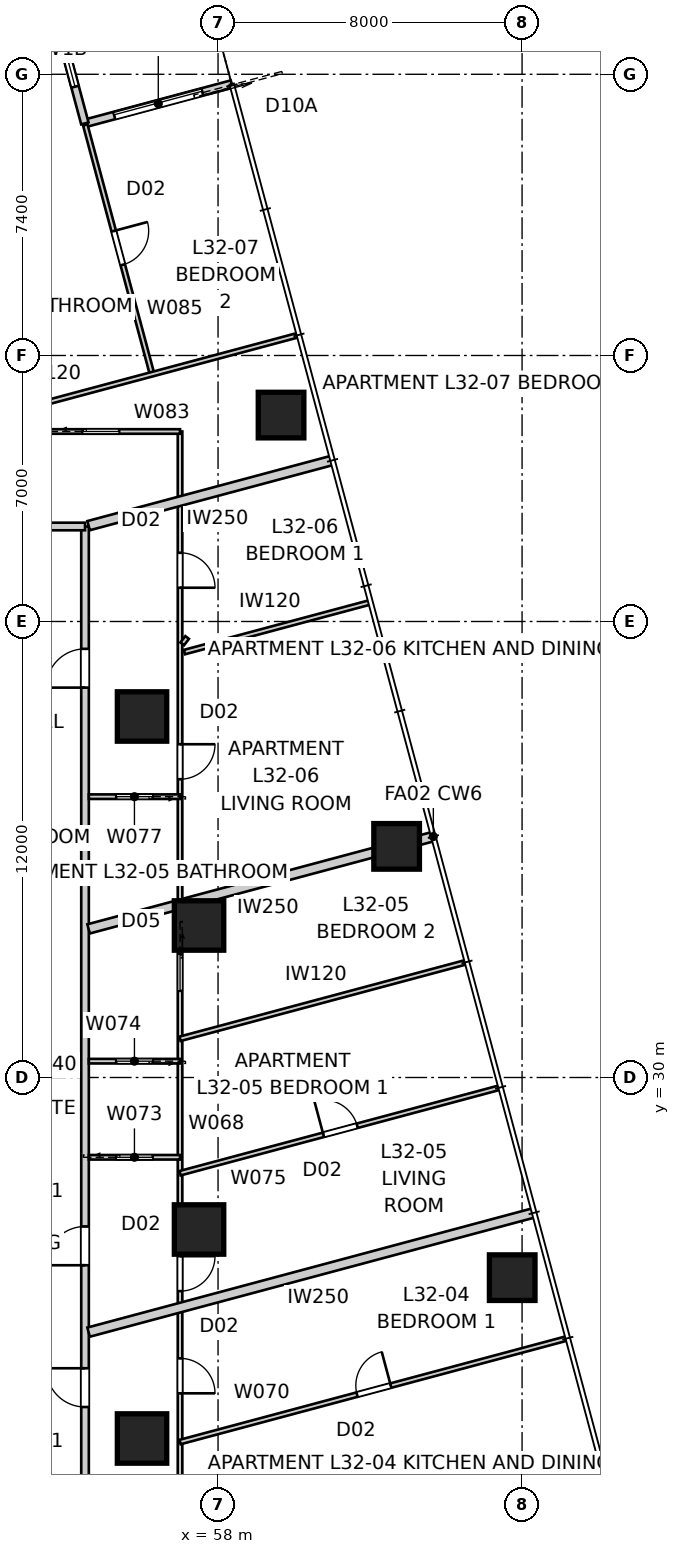
"""IFC4 building model, lengths in metres.
Left out: names, types, materials, properties, quantities, classifications, styles, units other than length and angle.
Written with IfcOpenShell. Run it as: python <this file> out.ifc"""

import sys

from ifc_helpers import new_model, si_unit, direction, frame, frame_2d, origin, origin_2d, place, context, subcontext, project, spatial, rectangle, extrude, element, fill, save


model = new_model("IFC4")
c1 = context("Model", 3, precision=1e-05, world=origin(), true_north=direction((0.0, 1.0)))
c2 = subcontext(c1, "Body", "Model", "MODEL_VIEW")
j1 = project(units=[si_unit("LENGTHUNIT", "METRE"), si_unit("PLANEANGLEUNIT", "RADIAN")], contexts=[c1])
p1 = place(None, origin())
s1 = spatial("IfcSite", under=j1, at=p1, CompositionType="ELEMENT")
p2 = place(p1, origin())
s2 = spatial("IfcBuilding", under=s1, at=p2, CompositionType="ELEMENT")
p3 = place(p2, frame((0.0, 0.0, 118.4)))
s3 = spatial("IfcBuildingStorey", under=s2, at=p3, CompositionType="ELEMENT", Elevation=118.4)
for number, where, z_axis, x_axis in (
    (1, (65.74, 24.733, 0.0), (0.0, 0.0, 1.0), (1.0, 0.0, 0.0)),
    (2, (62.699, 36.082, 0.0), (0.0, 0.0, 1.0), (1.0, 0.0, 0.0)),
    (3, (59.658, 47.432, 0.0), (0.0, 0.0, 1.0), (1.0, 0.0, 0.0)),
):
    element("IfcColumn", number, at=place(p3, frame(where, z_axis=z_axis, x_axis=x_axis)), inside=s3, PredefinedType="COLUMN", context=c2, shape_type="SweptSolid", body=[
        extrude(rectangle(XDim=1.2, YDim=1.2, at=origin_2d()), origin(), (0.0, 0.0, 1.0), 3.4),
    ])
for number, where, z_axis, x_axis in (
    (4, (57.5, 26.0, 0.0), (0.0, 0.0, 1.0), (1.0, 0.0, 0.0)),
    (5, (57.5, 34.0, 0.0), (0.0, 0.0, 1.0), (1.0, 0.0, 0.0)),
    (6, (56.0, 39.5, 0.0), (0.0, 0.0, 1.0), (1.0, 0.0, 0.0)),
    (7, (56.0, 20.5, 0.0), (0.0, 0.0, 1.0), (1.0, 0.0, 0.0)),
):
    element("IfcColumn", number, at=place(p3, frame(where, z_axis=z_axis, x_axis=x_axis)), inside=s3, PredefinedType="COLUMN", context=c2, shape_type="SweptSolid", body=[
        extrude(rectangle(XDim=1.3, YDim=1.3, at=origin_2d()), origin(), (0.0, 0.0, 1.0), 3.4),
    ])
p4 = place(p3, frame((58.359, 56.143, 0.0), z_axis=(0.0, 0.0, 1.0), x_axis=(-0.965919172068, -0.258843877716, 0.0)))
e8 = element("IfcWall", 8, at=p4, inside=s3, PredefinedType="SOLIDWALL", context=c2, shape_type="SweptSolid", body=[
    extrude(rectangle(XDim=4.0, YDim=0.2, at=frame_2d((2.0, 0.0))), origin(), (0.0, 0.0, 1.0), 3.25),
])
p5 = place(p4, frame((0.8, 0.0, 0.0)))
e9 = element("IfcOpeningElement", 9, at=p5, cuts=e8, PredefinedType="OPENING", context=c2, shape_type="SweptSolid", body=[
    extrude(rectangle(XDim=2.4, YDim=2.1, at=frame_2d((1.2, 1.05))), frame((0.0, 0.11, 0.0), z_axis=(0.0, -1.0, 0.0), x_axis=(1.0, 0.0, 0.0)), (0.0, 0.0, 1.0), 0.22),
])
p6 = place(p3, frame((54.496, 55.107, 0.0), z_axis=(0.0, 0.0, 1.0), x_axis=(-0.258786931944, 0.965934430412, 0.0)))
e10 = element("IfcWall", 10, at=p6, inside=s3, PredefinedType="SOLIDWALL", context=c2, shape_type="SweptSolid", body=[
    extrude(rectangle(XDim=4.0, YDim=0.2, at=frame_2d((2.0, 0.0))), origin(), (0.0, 0.0, 1.0), 3.25),
])
p7 = place(p6, frame((1.0, 0.0, 0.45)))
e11 = element("IfcOpeningElement", 11, at=p7, cuts=e10, PredefinedType="OPENING", context=c2, shape_type="SweptSolid", body=[
    extrude(rectangle(XDim=2.0, YDim=1.8, at=frame_2d((1.0, 0.9))), frame((0.0, 0.11, 0.0), z_axis=(0.0, -1.0, 0.0), x_axis=(1.0, 0.0, 0.0)), (0.0, 0.0, 1.0), 0.22),
])
p8 = place(p3, frame((54.5, 15.5, 0.0), z_axis=(0.0, 0.0, 1.0), x_axis=(0.0, 1.0, 0.0)))
e12 = element("IfcWall", 12, at=p8, inside=s3, PredefinedType="PARTITIONING", context=c2, shape_type="SweptSolid", body=[
    extrude(rectangle(XDim=29.0, YDim=0.2, at=frame_2d((14.5, 0.0))), origin(), (0.0, 0.0, 1.0), 3.25),
])
p9 = place(p8, frame((24.76, 0.0, 0.0)))
e13 = element("IfcOpeningElement", 13, at=p9, cuts=e12, PredefinedType="OPENING", context=c2, shape_type="SweptSolid", body=[
    extrude(rectangle(XDim=1.02, YDim=2.1, at=frame_2d((0.51, 1.05))), frame((0.0, 0.11, 0.0), z_axis=(0.0, -1.0, 0.0), x_axis=(1.0, 0.0, 0.0)), (0.0, 0.0, 1.0), 0.22),
])
p10 = place(p8, frame((5.829, 0.0, 0.0)))
e14 = element("IfcOpeningElement", 14, at=p10, cuts=e12, PredefinedType="OPENING", context=c2, shape_type="SweptSolid", body=[
    extrude(rectangle(XDim=1.02, YDim=2.34, at=frame_2d((0.51, 1.17))), frame((0.0, 0.11, 0.0), z_axis=(0.0, -1.0, 0.0), x_axis=(1.0, 0.0, 0.0)), (0.0, 0.0, 1.0), 0.22),
])
p11 = place(p8, frame((9.559, 0.0, 0.0)))
e15 = element("IfcOpeningElement", 15, at=p11, cuts=e12, PredefinedType="OPENING", context=c2, shape_type="SweptSolid", body=[
    extrude(rectangle(XDim=1.02, YDim=2.34, at=frame_2d((0.51, 1.17))), frame((0.0, 0.11, 0.0), z_axis=(0.0, -1.0, 0.0), x_axis=(1.0, 0.0, 0.0)), (0.0, 0.0, 1.0), 0.22),
])
p12 = place(p3, frame((54.5, 44.5, 0.0), z_axis=(0.0, 0.0, 1.0), x_axis=(-1.0, 0.0, 0.0)))
e16 = element("IfcWall", 16, at=p12, inside=s3, PredefinedType="PARTITIONING", context=c2, shape_type="SweptSolid", body=[
    extrude(rectangle(XDim=28.2, YDim=0.2, at=frame_2d((14.1, 0.0))), origin(), (0.0, 0.0, 1.0), 3.25),
])
p13 = place(p12, frame((10.837, 0.0, 0.0)))
e17 = element("IfcOpeningElement", 17, at=p13, cuts=e16, PredefinedType="OPENING", context=c2, shape_type="SweptSolid", body=[
    extrude(rectangle(XDim=1.02, YDim=2.34, at=frame_2d((0.51, 1.17))), frame((0.0, 0.11, 0.0), z_axis=(0.0, -1.0, 0.0), x_axis=(1.0, 0.0, 0.0)), (0.0, 0.0, 1.0), 0.22),
])
p14 = place(p12, frame((5.7, 0.0, 0.0)))
e18 = element("IfcOpeningElement", 18, at=p14, cuts=e16, PredefinedType="OPENING", context=c2, shape_type="SweptSolid", body=[
    extrude(rectangle(XDim=1.02, YDim=2.34, at=frame_2d((0.51, 1.17))), frame((0.0, 0.11, 0.0), z_axis=(0.0, -1.0, 0.0), x_axis=(1.0, 0.0, 0.0)), (0.0, 0.0, 1.0), 0.22),
])
p15 = place(p12, frame((26.127, 0.0, 0.0)))
e19 = element("IfcOpeningElement", 19, at=p15, cuts=e16, PredefinedType="OPENING", context=c2, shape_type="SweptSolid", body=[
    extrude(rectangle(XDim=1.02, YDim=2.34, at=frame_2d((0.51, 1.17))), frame((0.0, 0.11, 0.0), z_axis=(0.0, -1.0, 0.0), x_axis=(1.0, 0.0, 0.0)), (0.0, 0.0, 1.0), 0.22),
])
p16 = place(p3, frame((63.665, 36.341, 0.0), z_axis=(0.0, 0.0, 1.0), x_axis=(-0.965927049013, -0.258814481793, 0.0)))
e20 = element("IfcWall", 20, at=p16, inside=s3, PredefinedType="PARTITIONING", context=c2, shape_type="SweptSolid", body=[
    extrude(rectangle(XDim=9.392, YDim=0.25, at=frame_2d((4.696, 0.0))), origin(), (0.0, 0.0, 1.0), 3.25),
])
p17 = place(p3, frame((66.318, 26.44, 0.0), z_axis=(0.0, 0.0, 1.0), x_axis=(-0.965924438766, -0.258824223352, 0.0)))
e21 = element("IfcWall", 21, at=p17, inside=s3, PredefinedType="PARTITIONING", context=c2, shape_type="SweptSolid", body=[
    extrude(rectangle(XDim=12.138, YDim=0.25, at=frame_2d((6.069, 0.0))), origin(), (0.0, 0.0, 1.0), 3.25),
])
p18 = place(p3, frame((61.012, 46.242, 0.0), z_axis=(0.0, 0.0, 1.0), x_axis=(-0.965929355837, -0.25880587229, 0.0)))
e22 = element("IfcWall", 22, at=p18, inside=s3, PredefinedType="PARTITIONING", context=c2, shape_type="SweptSolid", body=[
    extrude(rectangle(XDim=6.645, YDim=0.25, at=frame_2d((3.322, 0.0))), origin(), (0.0, 0.0, 1.0), 3.25),
])
p19 = place(p3, frame((57.0, 47.0, 0.0), z_axis=(0.0, 0.0, 1.0), x_axis=(0.0, -1.0, 0.0)))
e23 = element("IfcWall", 23, at=p19, inside=s3, PredefinedType="PARTITIONING", context=c2, shape_type="SweptSolid", body=[
    extrude(rectangle(XDim=34.0, YDim=0.12, at=frame_2d((17.0, 0.0))), origin(), (0.0, 0.0, 1.0), 2.55),
])
p20 = place(p19, frame((8.23, 0.0, 0.0)))
e24 = element("IfcOpeningElement", 24, at=p20, cuts=e23, PredefinedType="OPENING", context=c2, shape_type="SweptSolid", body=[
    extrude(rectangle(XDim=0.92, YDim=2.34, at=frame_2d((0.46, 1.17))), frame((0.0, 0.07, 0.0), z_axis=(0.0, -1.0, 0.0), x_axis=(1.0, 0.0, 0.0)), (0.0, 0.0, 1.0), 0.14),
])
p21 = place(p19, frame((3.192, 0.0, 0.0)))
e25 = element("IfcOpeningElement", 25, at=p21, cuts=e23, PredefinedType="OPENING", context=c2, shape_type="SweptSolid", body=[
    extrude(rectangle(XDim=0.92, YDim=2.34, at=frame_2d((0.46, 1.17))), frame((0.0, 0.07, 0.0), z_axis=(0.0, -1.0, 0.0), x_axis=(1.0, 0.0, 0.0)), (0.0, 0.0, 1.0), 0.14),
])
p22 = place(p19, frame((24.391, 0.0, 0.0)))
e26 = element("IfcOpeningElement", 26, at=p22, cuts=e23, PredefinedType="OPENING", context=c2, shape_type="SweptSolid", body=[
    extrude(rectangle(XDim=0.92, YDim=2.34, at=frame_2d((0.46, 1.17))), frame((0.0, 0.07, 0.0), z_axis=(0.0, -1.0, 0.0), x_axis=(1.0, 0.0, 0.0)), (0.0, 0.0, 1.0), 0.14),
])
p23 = place(p19, frame((21.702, 0.0, 0.0)))
e27 = element("IfcOpeningElement", 27, at=p23, cuts=e23, PredefinedType="OPENING", context=c2, shape_type="SweptSolid", body=[
    extrude(rectangle(XDim=0.92, YDim=2.34, at=frame_2d((0.46, 1.17))), frame((0.0, 0.07, 0.0), z_axis=(0.0, -1.0, 0.0), x_axis=(1.0, 0.0, 0.0)), (0.0, 0.0, 1.0), 0.14),
])
p24 = place(p19, frame((31.459, 0.0, 0.0)))
e28 = element("IfcOpeningElement", 28, at=p24, cuts=e23, PredefinedType="OPENING", context=c2, shape_type="SweptSolid", body=[
    extrude(rectangle(XDim=0.96, YDim=2.1, at=frame_2d((0.48, 1.05))), frame((0.0, 0.07, 0.0), z_axis=(0.0, -1.0, 0.0), x_axis=(1.0, 0.0, 0.0)), (0.0, 0.0, 1.0), 0.14),
])
p25 = place(p19, frame((13.759, 0.0, 0.0)))
e29 = element("IfcOpeningElement", 29, at=p25, cuts=e23, PredefinedType="OPENING", context=c2, shape_type="SweptSolid", body=[
    extrude(rectangle(XDim=0.96, YDim=2.1, at=frame_2d((0.48, 1.05))), frame((0.0, 0.07, 0.0), z_axis=(0.0, -1.0, 0.0), x_axis=(1.0, 0.0, 0.0)), (0.0, 0.0, 1.0), 0.14),
])
p26 = place(p3, frame((57.0, 20.406, 0.0), z_axis=(0.0, 0.0, 1.0), x_axis=(0.9659257847, 0.258819200315, 0.0)))
e30 = element("IfcWall", 30, at=p26, inside=s3, PredefinedType="PARTITIONING", context=c2, shape_type="SweptSolid", body=[
    extrude(rectangle(XDim=10.522, YDim=0.12, at=frame_2d((5.261, 0.0))), origin(), (0.0, 0.0, 1.0), 2.722),
])
p27 = place(p26, frame((4.821, 0.0, 0.0)))
e31 = element("IfcOpeningElement", 31, at=p27, cuts=e30, PredefinedType="OPENING", context=c2, shape_type="SweptSolid", body=[
    extrude(rectangle(XDim=0.92, YDim=2.34, at=frame_2d((0.46, 1.17))), frame((0.0, 0.07, 0.0), z_axis=(0.0, -1.0, 0.0), x_axis=(1.0, 0.0, 0.0)), (0.0, 0.0, 1.0), 0.14),
])
p28 = place(p3, frame((54.6, 27.901, 0.0), z_axis=(0.0, 0.0, 1.0), x_axis=(1.0, 0.0, 0.0)))
e32 = element("IfcWall", 32, at=p28, inside=s3, PredefinedType="PARTITIONING", context=c2, shape_type="SweptSolid", body=[
    extrude(rectangle(XDim=2.4, YDim=0.12, at=frame_2d((1.2, 0.0))), origin(), (0.0, 0.0, 1.0), 3.25),
])
p29 = place(p28, frame((0.72, 0.0, 0.0)))
e33 = element("IfcOpeningElement", 33, at=p29, cuts=e32, PredefinedType="OPENING", context=c2, shape_type="SweptSolid", body=[
    extrude(rectangle(XDim=0.96, YDim=2.1, at=frame_2d((0.48, 1.05))), frame((0.0, 0.07, 0.0), z_axis=(0.0, -1.0, 0.0), x_axis=(1.0, 0.0, 0.0)), (0.0, 0.0, 1.0), 0.14),
])
p30 = place(p3, frame((57.0, 30.43, 0.0), z_axis=(0.0, 0.0, 1.0), x_axis=(-1.0, 0.0, 0.0)))
e34 = element("IfcWall", 34, at=p30, inside=s3, PredefinedType="PARTITIONING", context=c2, shape_type="SweptSolid", body=[
    extrude(rectangle(XDim=2.4, YDim=0.12, at=frame_2d((1.2, 0.0))), origin(), (0.0, 0.0, 1.0), 3.25),
])
p31 = place(p30, frame((0.72, 0.0, 0.0)))
e35 = element("IfcOpeningElement", 35, at=p31, cuts=e34, PredefinedType="OPENING", context=c2, shape_type="SweptSolid", body=[
    extrude(rectangle(XDim=0.96, YDim=2.1, at=frame_2d((0.48, 1.05))), frame((0.0, 0.07, 0.0), z_axis=(0.0, -1.0, 0.0), x_axis=(1.0, 0.0, 0.0)), (0.0, 0.0, 1.0), 0.14),
])
p32 = place(p3, frame((57.0, 27.481, 0.0), z_axis=(0.0, 0.0, 1.0), x_axis=(0.965925607751, 0.258819860698, 0.0)))
e36 = element("IfcWall", 36, at=p32, inside=s3, PredefinedType="PARTITIONING", context=c2, shape_type="SweptSolid", body=[
    extrude(rectangle(XDim=8.691, YDim=0.12, at=frame_2d((4.346, 0.0))), origin(), (0.0, 0.0, 1.0), 3.25),
])
p33 = place(p32, frame((3.906, 0.0, 0.0)))
e37 = element("IfcOpeningElement", 37, at=p33, cuts=e36, PredefinedType="OPENING", context=c2, shape_type="SweptSolid", body=[
    extrude(rectangle(XDim=0.92, YDim=2.34, at=frame_2d((0.46, 1.17))), frame((0.0, 0.07, 0.0), z_axis=(0.0, -1.0, 0.0), x_axis=(1.0, 0.0, 0.0)), (0.0, 0.0, 1.0), 0.14),
])
p34 = place(p3, frame((57.0, 31.018, 0.0), z_axis=(0.0, 0.0, 1.0), x_axis=(0.965927309482, 0.258813509689, 0.0)))
e38 = element("IfcWall", 38, at=p34, inside=s3, PredefinedType="PARTITIONING", context=c2, shape_type="SweptSolid", body=[
    extrude(rectangle(XDim=7.776, YDim=0.12, at=frame_2d((3.888, 0.0))), origin(), (0.0, 0.0, 1.0), 3.25),
])
p35 = place(p3, frame((57.0, 37.39, 0.0), z_axis=(0.0, 0.0, 1.0), x_axis=(-1.0, 0.0, 0.0)))
e39 = element("IfcWall", 39, at=p35, inside=s3, PredefinedType="PARTITIONING", context=c2, shape_type="SweptSolid", body=[
    extrude(rectangle(XDim=2.4, YDim=0.12, at=frame_2d((1.2, 0.0))), origin(), (0.0, 0.0, 1.0), 3.25),
])
p36 = place(p35, frame((0.72, 0.0, 0.0)))
e40 = element("IfcOpeningElement", 40, at=p36, cuts=e39, PredefinedType="OPENING", context=c2, shape_type="SweptSolid", body=[
    extrude(rectangle(XDim=0.96, YDim=2.1, at=frame_2d((0.48, 1.05))), frame((0.0, 0.07, 0.0), z_axis=(0.0, -1.0, 0.0), x_axis=(1.0, 0.0, 0.0)), (0.0, 0.0, 1.0), 0.14),
])
p37 = place(p3, frame((57.187, 41.58, 0.0), z_axis=(0.0, 0.0, 1.0), x_axis=(-0.609039064162, -0.793140226142, 0.0)))
e41 = element("IfcWall", 41, at=p37, inside=s3, PredefinedType="PARTITIONING", context=c2, shape_type="SweptSolid", body=[
    extrude(rectangle(XDim=0.211, YDim=0.12, at=frame_2d((0.105, 0.0))), origin(), (0.0, 0.0, 1.0), 3.25),
])
p38 = place(p3, frame((57.116, 41.195, 0.0), z_axis=(0.0, 0.0, 1.0), x_axis=(0.965921615375, 0.258834759935, 0.0)))
e42 = element("IfcWall", 42, at=p38, inside=s3, PredefinedType="PARTITIONING", context=c2, shape_type="SweptSolid", body=[
    extrude(rectangle(XDim=5.029, YDim=0.12, at=frame_2d((2.515, 0.0))), origin(), (0.0, 0.0, 1.0), 2.722),
])
p39 = place(p3, frame((50.853, 47.0, 0.0), z_axis=(0.0, 0.0, 1.0), x_axis=(1.0, 0.0, 0.0)))
e43 = element("IfcWall", 43, at=p39, inside=s3, PredefinedType="PARTITIONING", context=c2, shape_type="SweptSolid", body=[
    extrude(rectangle(XDim=6.147, YDim=0.12, at=frame_2d((3.074, 0.0))), origin(), (0.0, 0.0, 1.0), 3.25),
])
p40 = place(p39, frame((3.585, 0.0, 0.0)))
e44 = element("IfcOpeningElement", 44, at=p40, cuts=e43, PredefinedType="OPENING", context=c2, shape_type="SweptSolid", body=[
    extrude(rectangle(XDim=0.96, YDim=2.1, at=frame_2d((0.48, 1.05))), frame((0.0, 0.07, 0.0), z_axis=(0.0, -1.0, 0.0), x_axis=(1.0, 0.0, 0.0)), (0.0, 0.0, 1.0), 0.14),
])
p41 = place(p3, frame((54.506, 55.069, 0.0), z_axis=(0.0, 0.0, 1.0), x_axis=(0.258830095464, -0.965922865286, 0.0)))
e45 = element("IfcWall", 45, at=p41, inside=s3, PredefinedType="PARTITIONING", context=c2, shape_type="SweptSolid", body=[
    extrude(rectangle(XDim=6.793, YDim=0.12, at=frame_2d((3.396, 0.0))), origin(), (0.0, 0.0, 1.0), 3.25),
])
p42 = place(p41, frame((2.892, 0.0, 0.0)))
e46 = element("IfcOpeningElement", 46, at=p42, cuts=e45, PredefinedType="OPENING", context=c2, shape_type="SweptSolid", body=[
    extrude(rectangle(XDim=0.92, YDim=2.34, at=frame_2d((0.46, 1.17))), frame((0.0, 0.07, 0.0), z_axis=(0.0, -1.0, 0.0), x_axis=(1.0, 0.0, 0.0)), (0.0, 0.0, 1.0), 0.14),
])
p43 = place(p3, frame((60.089, 49.532, 0.0), z_axis=(0.0, 0.0, 1.0), x_axis=(-0.965927203676, -0.25881390457, 0.0)))
e47 = element("IfcWall", 47, at=p43, inside=s3, PredefinedType="PARTITIONING", context=c2, shape_type="SweptSolid", body=[
    extrude(rectangle(XDim=9.357, YDim=0.12, at=frame_2d((4.678, 0.0))), origin(), (0.0, 0.0, 1.0), 2.638),
])
p44 = place(p5, origin())
e48 = element("IfcDoor", 48, at=p44, inside=s3, OperationType="SLIDING_TO_LEFT", PredefinedType="DOOR", context=c2, shape_type="SweptSolid", body=[
    extrude(rectangle(XDim=2.4, YDim=2.1, at=frame_2d((1.2, 1.05))), frame((0.0, 0.025, 0.0), z_axis=(0.0, -1.0, 0.0), x_axis=(1.0, 0.0, 0.0)), (0.0, 0.0, 1.0), 0.05),
])
fill(e9, e48)
p45 = place(p7, origin())
e49 = element("IfcWindow", 49, at=p45, inside=s3, PartitioningType="SINGLE_PANEL", PredefinedType="WINDOW", context=c2, shape_type="SweptSolid", body=[
    extrude(rectangle(XDim=2.0, YDim=1.8, at=frame_2d((1.0, 0.9))), frame((0.0, 0.03, 0.0), z_axis=(0.0, -1.0, 0.0), x_axis=(1.0, 0.0, 0.0)), (0.0, 0.0, 1.0), 0.06),
])
fill(e11, e49)
p46 = place(p9, origin())
e50 = element("IfcDoor", 50, at=p46, inside=s3, OperationType="SINGLE_SWING_LEFT", PredefinedType="DOOR", context=c2, shape_type="SweptSolid", body=[
    extrude(rectangle(XDim=1.02, YDim=2.1, at=frame_2d((0.51, 1.05))), frame((0.0, 0.025, 0.0), z_axis=(0.0, -1.0, 0.0), x_axis=(1.0, 0.0, 0.0)), (0.0, 0.0, 1.0), 0.05),
])
fill(e13, e50)
p47 = place(p10, origin())
e51 = element("IfcDoor", 51, at=p47, inside=s3, OperationType="SINGLE_SWING_RIGHT", PredefinedType="DOOR", context=c2, shape_type="SweptSolid", body=[
    extrude(rectangle(XDim=1.02, YDim=2.34, at=frame_2d((0.51, 1.17))), frame((0.0, 0.025, 0.0), z_axis=(0.0, -1.0, 0.0), x_axis=(1.0, 0.0, 0.0)), (0.0, 0.0, 1.0), 0.05),
])
fill(e14, e51)
p48 = place(p11, origin())
e52 = element("IfcDoor", 52, at=p48, inside=s3, OperationType="SINGLE_SWING_LEFT", PredefinedType="DOOR", context=c2, shape_type="SweptSolid", body=[
    extrude(rectangle(XDim=1.02, YDim=2.34, at=frame_2d((0.51, 1.17))), frame((0.0, 0.025, 0.0), z_axis=(0.0, -1.0, 0.0), x_axis=(1.0, 0.0, 0.0)), (0.0, 0.0, 1.0), 0.05),
])
fill(e15, e52)
p49 = place(p20, origin())
e53 = element("IfcDoor", 53, at=p49, inside=s3, OperationType="SINGLE_SWING_LEFT", PredefinedType="DOOR", context=c2, shape_type="SweptSolid", body=[
    extrude(rectangle(XDim=0.92, YDim=2.34, at=frame_2d((0.46, 1.17))), frame((0.0, 0.025, 0.0), z_axis=(0.0, -1.0, 0.0), x_axis=(1.0, 0.0, 0.0)), (0.0, 0.0, 1.0), 0.05),
])
fill(e24, e53)
p50 = place(p21, origin())
e54 = element("IfcDoor", 54, at=p50, inside=s3, OperationType="SINGLE_SWING_RIGHT", PredefinedType="DOOR", context=c2, shape_type="SweptSolid", body=[
    extrude(rectangle(XDim=0.92, YDim=2.34, at=frame_2d((0.46, 1.17))), frame((0.0, 0.025, 0.0), z_axis=(0.0, -1.0, 0.0), x_axis=(1.0, 0.0, 0.0)), (0.0, 0.0, 1.0), 0.05),
])
fill(e25, e54)
p51 = place(p36, origin())
e55 = element("IfcDoor", 55, at=p51, inside=s3, OperationType="SLIDING_TO_LEFT", PredefinedType="DOOR", context=c2, shape_type="SweptSolid", body=[
    extrude(rectangle(XDim=0.96, YDim=2.1, at=frame_2d((0.48, 1.05))), frame((0.0, 0.025, 0.0), z_axis=(0.0, -1.0, 0.0), x_axis=(1.0, 0.0, 0.0)), (0.0, 0.0, 1.0), 0.05),
])
fill(e40, e55)
p52 = place(p22, origin())
e56 = element("IfcDoor", 56, at=p52, inside=s3, OperationType="SINGLE_SWING_RIGHT", PredefinedType="DOOR", context=c2, shape_type="SweptSolid", body=[
    extrude(rectangle(XDim=0.92, YDim=2.34, at=frame_2d((0.46, 1.17))), frame((0.0, 0.025, 0.0), z_axis=(0.0, -1.0, 0.0), x_axis=(1.0, 0.0, 0.0)), (0.0, 0.0, 1.0), 0.05),
])
fill(e26, e56)
p53 = place(p23, origin())
e57 = element("IfcDoor", 57, at=p53, inside=s3, OperationType="SINGLE_SWING_LEFT", PredefinedType="DOOR", context=c2, shape_type="SweptSolid", body=[
    extrude(rectangle(XDim=0.92, YDim=2.34, at=frame_2d((0.46, 1.17))), frame((0.0, 0.025, 0.0), z_axis=(0.0, -1.0, 0.0), x_axis=(1.0, 0.0, 0.0)), (0.0, 0.0, 1.0), 0.05),
])
fill(e27, e57)
p54 = place(p29, origin())
e58 = element("IfcDoor", 58, at=p54, inside=s3, OperationType="SLIDING_TO_LEFT", PredefinedType="DOOR", context=c2, shape_type="SweptSolid", body=[
    extrude(rectangle(XDim=0.96, YDim=2.1, at=frame_2d((0.48, 1.05))), frame((0.0, 0.025, 0.0), z_axis=(0.0, -1.0, 0.0), x_axis=(1.0, 0.0, 0.0)), (0.0, 0.0, 1.0), 0.05),
])
fill(e33, e58)
p55 = place(p40, origin())
e59 = element("IfcDoor", 59, at=p55, inside=s3, OperationType="SLIDING_TO_LEFT", PredefinedType="DOOR", context=c2, shape_type="SweptSolid", body=[
    extrude(rectangle(XDim=0.96, YDim=2.1, at=frame_2d((0.48, 1.05))), frame((0.0, 0.025, 0.0), z_axis=(0.0, -1.0, 0.0), x_axis=(1.0, 0.0, 0.0)), (0.0, 0.0, 1.0), 0.05),
])
fill(e44, e59)
p56 = place(p33, origin())
e60 = element("IfcDoor", 60, at=p56, inside=s3, OperationType="SINGLE_SWING_LEFT", PredefinedType="DOOR", context=c2, shape_type="SweptSolid", body=[
    extrude(rectangle(XDim=0.92, YDim=2.34, at=frame_2d((0.46, 1.17))), frame((0.0, 0.025, 0.0), z_axis=(0.0, -1.0, 0.0), x_axis=(1.0, 0.0, 0.0)), (0.0, 0.0, 1.0), 0.05),
])
fill(e37, e60)
p57 = place(p31, origin())
e61 = element("IfcDoor", 61, at=p57, inside=s3, OperationType="SLIDING_TO_LEFT", PredefinedType="DOOR", context=c2, shape_type="SweptSolid", body=[
    extrude(rectangle(XDim=0.96, YDim=2.1, at=frame_2d((0.48, 1.05))), frame((0.0, 0.025, 0.0), z_axis=(0.0, -1.0, 0.0), x_axis=(1.0, 0.0, 0.0)), (0.0, 0.0, 1.0), 0.05),
])
fill(e35, e61)
p58 = place(p25, origin())
e62 = element("IfcDoor", 62, at=p58, inside=s3, OperationType="SLIDING_TO_LEFT", PredefinedType="DOOR", context=c2, shape_type="SweptSolid", body=[
    extrude(rectangle(XDim=0.96, YDim=2.1, at=frame_2d((0.48, 1.05))), frame((0.0, 0.025, 0.0), z_axis=(0.0, -1.0, 0.0), x_axis=(1.0, 0.0, 0.0)), (0.0, 0.0, 1.0), 0.05),
])
fill(e29, e62)
p59 = place(p27, origin())
e63 = element("IfcDoor", 63, at=p59, inside=s3, OperationType="SINGLE_SWING_RIGHT", PredefinedType="DOOR", context=c2, shape_type="SweptSolid", body=[
    extrude(rectangle(XDim=0.92, YDim=2.34, at=frame_2d((0.46, 1.17))), frame((0.0, 0.025, 0.0), z_axis=(0.0, -1.0, 0.0), x_axis=(1.0, 0.0, 0.0)), (0.0, 0.0, 1.0), 0.05),
])
fill(e31, e63)
p60 = place(p42, origin())
e64 = element("IfcDoor", 64, at=p60, inside=s3, OperationType="SINGLE_SWING_LEFT", PredefinedType="DOOR", context=c2, shape_type="SweptSolid", body=[
    extrude(rectangle(XDim=0.92, YDim=2.34, at=frame_2d((0.46, 1.17))), frame((0.0, 0.025, 0.0), z_axis=(0.0, -1.0, 0.0), x_axis=(1.0, 0.0, 0.0)), (0.0, 0.0, 1.0), 0.05),
])
fill(e46, e64)
save(model, sys.argv[1])
